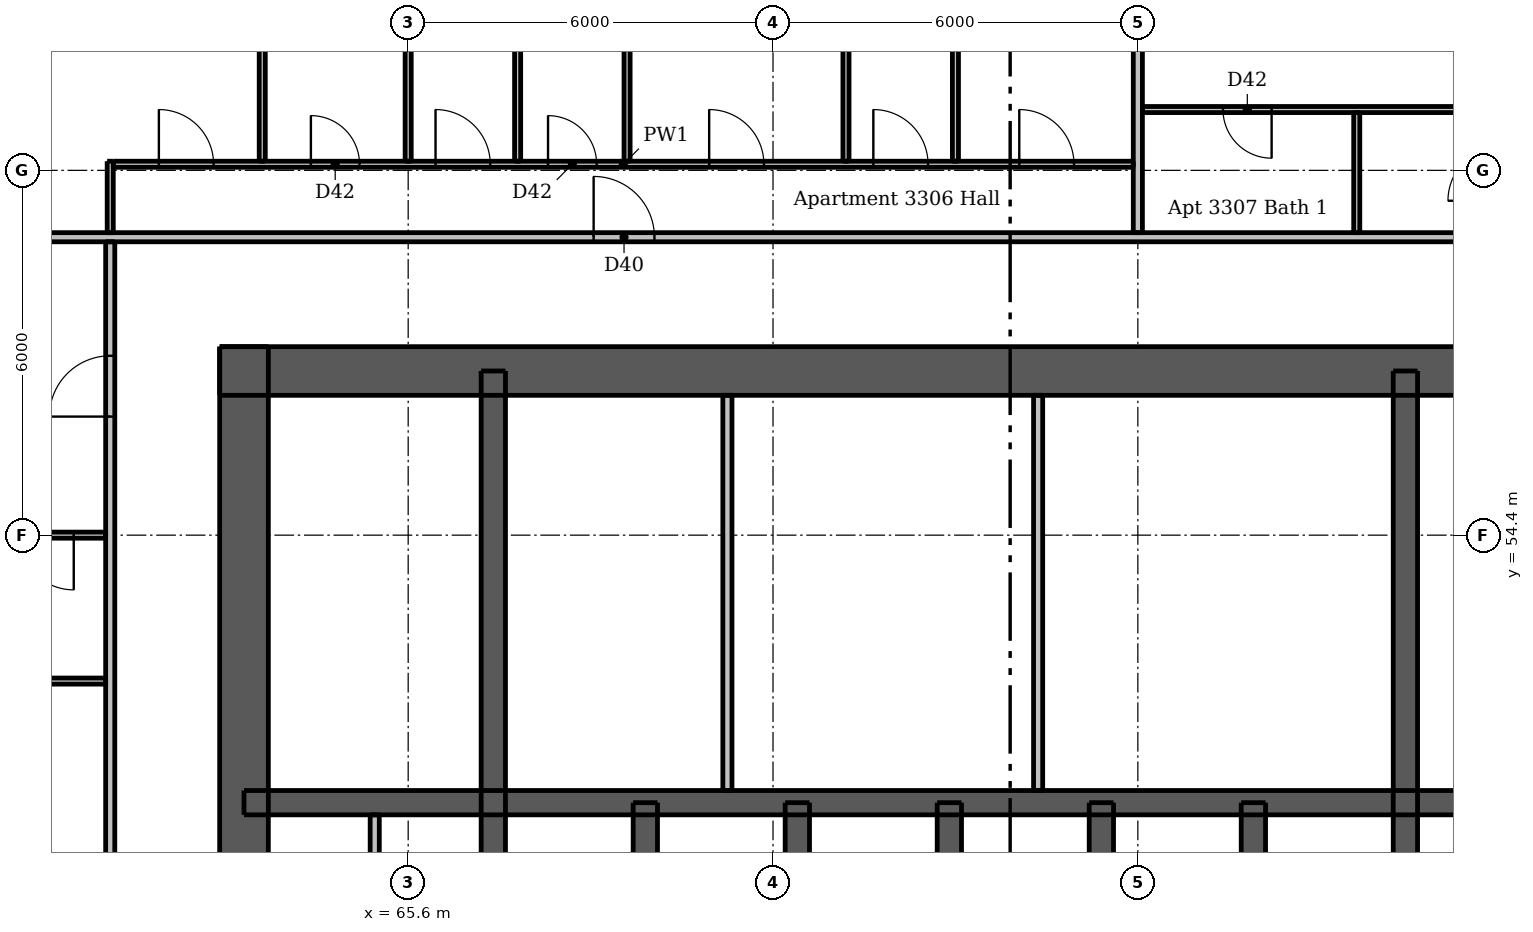
"""IFC4 building model, lengths in metres.
Left out: names, types, materials, properties, quantities, classifications, styles, units other than length and angle.
Written with IfcOpenShell. Run it as: python <this file> out.ifc"""

import sys

from ifc_helpers import new_model, si_unit, direction, frame, frame_2d, origin, place, context, subcontext, project, spatial, rectangle, extrude, element, fill, save


model = new_model("IFC4")
c1 = context("Model", 3, precision=1e-05, world=origin(), true_north=direction((0.0, 1.0)))
c2 = subcontext(c1, "Body", "Model", "MODEL_VIEW")
j1 = project(units=[si_unit("LENGTHUNIT", "METRE"), si_unit("PLANEANGLEUNIT", "RADIAN")], contexts=[c1])
p1 = place(None, origin())
s1 = spatial("IfcSite", under=j1, at=p1, CompositionType="ELEMENT")
p2 = place(p1, origin())
s2 = spatial("IfcBuilding", under=s1, at=p2, CompositionType="ELEMENT")
p3 = place(p2, frame((0.0, 0.0, 121.6)))
s3 = spatial("IfcBuildingStorey", under=s2, at=p3, CompositionType="ELEMENT", Elevation=121.6)
p4 = place(p3, frame((62.5, 57.1, 0.0), z_axis=(0.0, 0.0, 1.0), x_axis=(1.0, 0.0, 0.0)))
e1 = element("IfcWall", 1, at=p4, inside=s3, PredefinedType="SHEAR", context=c2, shape_type="SweptSolid", body=[
    extrude(rectangle(XDim=24.0, YDim=0.8, at=frame_2d((12.0, 0.0))), origin(), (0.0, 0.0, 1.0), 2.95),
])
p5 = place(p4, frame((20.9, 0.0, 0.0)))
e2 = element("IfcOpeningElement", 2, at=p5, cuts=e1, PredefinedType="OPENING", context=c2, shape_type="SweptSolid", body=[
    extrude(rectangle(XDim=1.1, YDim=2.1, at=frame_2d((0.55, 1.05))), frame((0.0, 0.41, 0.0), z_axis=(0.0, -1.0, 0.0), x_axis=(1.0, 0.0, 0.0)), (0.0, 0.0, 1.0), 0.82),
])
p6 = place(p4, frame((2.0, 0.0, 0.0)))
e3 = element("IfcOpeningElement", 3, at=p6, cuts=e1, PredefinedType="OPENING", context=c2, shape_type="SweptSolid", body=[
    extrude(rectangle(XDim=1.1, YDim=2.1, at=frame_2d((0.55, 1.05))), frame((0.0, 0.41, 0.0), z_axis=(0.0, -1.0, 0.0), x_axis=(1.0, 0.0, 0.0)), (0.0, 0.0, 1.0), 0.82),
])
p7 = place(p4, frame((6.075, 0.0, 0.0)))
e4 = element("IfcOpeningElement", 4, at=p7, cuts=e1, PredefinedType="OPENING", context=c2, shape_type="SweptSolid", body=[
    extrude(rectangle(XDim=0.9, YDim=2.1, at=frame_2d((0.45, 1.05))), frame((0.0, 0.41, 0.0), z_axis=(0.0, -1.0, 0.0), x_axis=(1.0, 0.0, 0.0)), (0.0, 0.0, 1.0), 0.82),
])
p8 = place(p4, frame((10.455, 0.0, 0.0)))
e5 = element("IfcOpeningElement", 5, at=p8, cuts=e1, PredefinedType="OPENING", context=c2, shape_type="SweptSolid", body=[
    extrude(rectangle(XDim=0.9, YDim=2.1, at=frame_2d((0.45, 1.05))), frame((0.0, 0.41, 0.0), z_axis=(0.0, -1.0, 0.0), x_axis=(1.0, 0.0, 0.0)), (0.0, 0.0, 1.0), 0.82),
])
p9 = place(p4, frame((15.93, 0.0, 0.0)))
e6 = element("IfcOpeningElement", 6, at=p9, cuts=e1, PredefinedType="OPENING", context=c2, shape_type="SweptSolid", body=[
    extrude(rectangle(XDim=0.9, YDim=2.1, at=frame_2d((0.45, 1.05))), frame((0.0, 0.41, 0.0), z_axis=(0.0, -1.0, 0.0), x_axis=(1.0, 0.0, 0.0)), (0.0, 0.0, 1.0), 0.82),
])
p10 = place(p3, frame((62.9, 33.5, 0.0), z_axis=(0.0, 0.0, 1.0), x_axis=(0.0, 1.0, 0.0)))
e7 = element("IfcWall", 7, at=p10, inside=s3, PredefinedType="SHEAR", context=c2, shape_type="SweptSolid", body=[
    extrude(rectangle(XDim=24.0, YDim=0.8, at=frame_2d((12.0, 0.0))), origin(), (0.0, 0.0, 1.0), 2.95),
])
p11 = place(p10, frame((11.2, 0.0, 0.0)))
e8 = element("IfcOpeningElement", 8, at=p11, cuts=e7, PredefinedType="OPENING", context=c2, shape_type="SweptSolid", body=[
    extrude(rectangle(XDim=1.6, YDim=2.1, at=frame_2d((0.8, 1.05))), frame((0.0, 0.41, 0.0), z_axis=(0.0, -1.0, 0.0), x_axis=(1.0, 0.0, 0.0)), (0.0, 0.0, 1.0), 0.82),
])
p12 = place(p3, frame((62.9, 50.0, 0.0), z_axis=(0.0, 0.0, 1.0), x_axis=(1.0, 0.0, 0.0)))
e9 = element("IfcWall", 9, at=p12, inside=s3, PredefinedType="SHEAR", context=c2, shape_type="SweptSolid", body=[
    extrude(rectangle(XDim=23.2, YDim=0.4, at=frame_2d((11.6, 0.0))), origin(), (0.0, 0.0, 1.0), 2.95),
])
for number, where, z_axis, x_axis in (
    (10, (67.0, 47.1, 0.0), (0.0, 0.0, 1.0), (0.0, 1.0, 0.0)),
    (11, (82.0, 47.1, 0.0), (0.0, 0.0, 1.0), (0.0, 1.0, 0.0)),
):
    element("IfcWall", number, at=place(p3, frame(where, z_axis=z_axis, x_axis=x_axis)), inside=s3, PredefinedType="SHEAR", context=c2, shape_type="SweptSolid", body=[
        extrude(rectangle(XDim=10.0, YDim=0.4, at=frame_2d((5.0, 0.0))), origin(), (0.0, 0.0, 1.0), 2.95),
    ])
for number, where, z_axis, x_axis in (
    (12, (69.5, 47.1, 0.0), (0.0, 0.0, 1.0), (0.0, 1.0, 0.0)),
    (13, (72.0, 47.1, 0.0), (0.0, 0.0, 1.0), (0.0, 1.0, 0.0)),
    (14, (74.5, 47.1, 0.0), (0.0, 0.0, 1.0), (0.0, 1.0, 0.0)),
    (15, (77.0, 47.1, 0.0), (0.0, 0.0, 1.0), (0.0, 1.0, 0.0)),
    (16, (79.5, 47.1, 0.0), (0.0, 0.0, 1.0), (0.0, 1.0, 0.0)),
):
    element("IfcWall", number, at=place(p3, frame(where, z_axis=z_axis, x_axis=x_axis)), inside=s3, PredefinedType="SHEAR", context=c2, shape_type="SweptSolid", body=[
        extrude(rectangle(XDim=2.9, YDim=0.4, at=frame_2d((1.45, 0.0))), origin(), (0.0, 0.0, 1.0), 2.95),
    ])
p13 = place(p3, frame((65.05, 47.3, 0.0), z_axis=(0.0, 0.0, 1.0), x_axis=(0.0, 1.0, 0.0)))
e17 = element("IfcWall", 17, at=p13, inside=s3, PredefinedType="PLUMBINGWALL", context=c2, shape_type="SweptSolid", body=[
    extrude(rectangle(XDim=2.5, YDim=0.15, at=frame_2d((1.25, 0.0))), origin(), (0.0, 0.0, 1.0), 2.95),
])
for number, where, z_axis, x_axis in (
    (18, (70.85, 50.2, 0.0), (0.0, 0.0, 1.0), (0.0, 1.0, 0.0)),
    (19, (75.96, 50.2, 0.0), (0.0, 0.0, 1.0), (0.0, 1.0, 0.0)),
):
    element("IfcWall", number, at=place(p3, frame(where, z_axis=z_axis, x_axis=x_axis)), inside=s3, PredefinedType="PLUMBINGWALL", context=c2, shape_type="SweptSolid", body=[
        extrude(rectangle(XDim=6.5, YDim=0.15, at=frame_2d((3.25, 0.0))), origin(), (0.0, 0.0, 1.0), 2.95),
    ])
p14 = place(p3, frame((60.7, 59.375, 0.0), z_axis=(0.0, 0.0, 1.0), x_axis=(0.0, 1.0, 0.0)))
e20 = element("IfcWall", 20, at=p14, inside=s3, PredefinedType="PARTITIONING", context=c2, shape_type="SweptSolid", body=[
    extrude(rectangle(XDim=1.175, YDim=0.1, at=frame_2d((0.587, 0.0))), origin(), (0.0, 0.0, 1.0), 2.95),
])
p15 = place(p3, frame((63.2, 60.55, 0.0), z_axis=(0.0, 0.0, 1.0), x_axis=(0.0, 1.0, 0.0)))
e21 = element("IfcWall", 21, at=p15, inside=s3, PredefinedType="PARTITIONING", context=c2, shape_type="SweptSolid", body=[
    extrude(rectangle(XDim=4.9, YDim=0.1, at=frame_2d((2.45, 0.0))), origin(), (0.0, 0.0, 1.0), 2.95),
])
p16 = place(p3, frame((65.6, 60.55, 0.0), z_axis=(0.0, 0.0, 1.0), x_axis=(0.0, 1.0, 0.0)))
e22 = element("IfcWall", 22, at=p16, inside=s3, PredefinedType="PARTITIONING", context=c2, shape_type="SweptSolid", body=[
    extrude(rectangle(XDim=7.45, YDim=0.1, at=frame_2d((3.725, 0.0))), origin(), (0.0, 0.0, 1.0), 2.332),
])
p17 = place(p3, frame((67.4, 60.55, 0.0), z_axis=(0.0, 0.0, 1.0), x_axis=(0.0, 1.0, 0.0)))
e23 = element("IfcWall", 23, at=p17, inside=s3, PredefinedType="PARTITIONING", context=c2, shape_type="SweptSolid", body=[
    extrude(rectangle(XDim=4.8, YDim=0.1, at=frame_2d((2.4, 0.0))), origin(), (0.0, 0.0, 1.0), 2.95),
])
for number, where, z_axis, x_axis in (
    (24, (69.2, 60.55, 0.0), (0.0, 0.0, 1.0), (0.0, 1.0, 0.0)),
    (25, (72.8, 60.55, 0.0), (0.0, 0.0, 1.0), (0.0, 1.0, 0.0)),
):
    element("IfcWall", number, at=place(p3, frame(where, z_axis=z_axis, x_axis=x_axis)), inside=s3, PredefinedType="PARTITIONING", context=c2, shape_type="SweptSolid", body=[
        extrude(rectangle(XDim=4.9, YDim=0.1, at=frame_2d((2.45, 0.0))), origin(), (0.0, 0.0, 1.0), 2.95),
    ])
p18 = place(p3, frame((74.6, 60.55, 0.0), z_axis=(0.0, 0.0, 1.0), x_axis=(0.0, 1.0, 0.0)))
e26 = element("IfcWall", 26, at=p18, inside=s3, PredefinedType="PARTITIONING", context=c2, shape_type="SweptSolid", body=[
    extrude(rectangle(XDim=4.8, YDim=0.1, at=frame_2d((2.4, 0.0))), origin(), (0.0, 0.0, 1.0), 2.95),
])
p19 = place(p3, frame((81.2, 59.375, 0.0), z_axis=(0.0, 0.0, 1.0), x_axis=(0.0, 1.0, 0.0)))
e27 = element("IfcWall", 27, at=p19, inside=s3, PredefinedType="PARTITIONING", context=c2, shape_type="SweptSolid", body=[
    extrude(rectangle(XDim=1.975, YDim=0.1, at=frame_2d((0.988, 0.0))), origin(), (0.0, 0.0, 1.0), 2.95),
])
p20 = place(p3, frame((83.55, 61.4, 0.0), z_axis=(0.0, 0.0, 1.0), x_axis=(-1.0, 0.0, 0.0)))
e28 = element("IfcWall", 28, at=p20, inside=s3, PredefinedType="PARTITIONING", context=c2, shape_type="SweptSolid", body=[
    extrude(rectangle(XDim=5.875, YDim=0.1, at=frame_2d((2.938, 0.0))), origin(), (0.0, 0.0, 1.0), 2.95),
])
p21 = place(p20, frame((3.75, 0.0, 0.0)))
e29 = element("IfcOpeningElement", 29, at=p21, cuts=e28, PredefinedType="OPENING", context=c2, shape_type="SweptSolid", body=[
    extrude(rectangle(XDim=0.8, YDim=2.1, at=frame_2d((0.4, 1.05))), frame((0.0, 0.06, 0.0), z_axis=(0.0, -1.0, 0.0), x_axis=(1.0, 0.0, 0.0)), (0.0, 0.0, 1.0), 0.12),
])
p22 = place(p3, frame((60.75, 60.5, 0.0), z_axis=(0.0, 0.0, 1.0), x_axis=(1.0, 0.0, 0.0)))
e30 = element("IfcWall", 30, at=p22, inside=s3, PredefinedType="PARTITIONING", context=c2, shape_type="SweptSolid", body=[
    extrude(rectangle(XDim=16.775, YDim=0.1, at=frame_2d((8.387, 0.0))), origin(), (0.0, 0.0, 1.0), 2.95),
])
p23 = place(p22, frame((9.8, 0.0, 0.0)))
e31 = element("IfcOpeningElement", 31, at=p23, cuts=e30, PredefinedType="OPENING", context=c2, shape_type="SweptSolid", body=[
    extrude(rectangle(XDim=0.9, YDim=2.1, at=frame_2d((0.45, 1.05))), frame((0.0, 0.06, 0.0), z_axis=(0.0, -1.0, 0.0), x_axis=(1.0, 0.0, 0.0)), (0.0, 0.0, 1.0), 0.12),
])
p24 = place(p22, frame((14.9, 0.0, 0.0)))
e32 = element("IfcOpeningElement", 32, at=p24, cuts=e30, PredefinedType="OPENING", context=c2, shape_type="SweptSolid", body=[
    extrude(rectangle(XDim=0.9, YDim=2.1, at=frame_2d((0.45, 1.05))), frame((0.0, 0.06, 0.0), z_axis=(0.0, -1.0, 0.0), x_axis=(1.0, 0.0, 0.0)), (0.0, 0.0, 1.0), 0.12),
])
p25 = place(p22, frame((12.5, 0.0, 0.0)))
e33 = element("IfcOpeningElement", 33, at=p25, cuts=e30, PredefinedType="OPENING", context=c2, shape_type="SweptSolid", body=[
    extrude(rectangle(XDim=0.9, YDim=2.1, at=frame_2d((0.45, 1.05))), frame((0.0, 0.06, 0.0), z_axis=(0.0, -1.0, 0.0), x_axis=(1.0, 0.0, 0.0)), (0.0, 0.0, 1.0), 0.12),
])
p26 = place(p22, frame((5.3, 0.0, 0.0)))
e34 = element("IfcOpeningElement", 34, at=p26, cuts=e30, PredefinedType="OPENING", context=c2, shape_type="SweptSolid", body=[
    extrude(rectangle(XDim=0.9, YDim=2.1, at=frame_2d((0.45, 1.05))), frame((0.0, 0.06, 0.0), z_axis=(0.0, -1.0, 0.0), x_axis=(1.0, 0.0, 0.0)), (0.0, 0.0, 1.0), 0.12),
])
p27 = place(p22, frame((7.15, 0.0, 0.0)))
e35 = element("IfcOpeningElement", 35, at=p27, cuts=e30, PredefinedType="OPENING", context=c2, shape_type="SweptSolid", body=[
    extrude(rectangle(XDim=0.8, YDim=2.1, at=frame_2d((0.4, 1.05))), frame((0.0, 0.06, 0.0), z_axis=(0.0, -1.0, 0.0), x_axis=(1.0, 0.0, 0.0)), (0.0, 0.0, 1.0), 0.12),
])
p28 = place(p22, frame((0.75, 0.0, 0.0)))
e36 = element("IfcOpeningElement", 36, at=p28, cuts=e30, PredefinedType="OPENING", context=c2, shape_type="SweptSolid", body=[
    extrude(rectangle(XDim=0.9, YDim=2.1, at=frame_2d((0.45, 1.05))), frame((0.0, 0.06, 0.0), z_axis=(0.0, -1.0, 0.0), x_axis=(1.0, 0.0, 0.0)), (0.0, 0.0, 1.0), 0.12),
])
p29 = place(p22, frame((3.25, 0.0, 0.0)))
e37 = element("IfcOpeningElement", 37, at=p29, cuts=e30, PredefinedType="OPENING", context=c2, shape_type="SweptSolid", body=[
    extrude(rectangle(XDim=0.8, YDim=2.1, at=frame_2d((0.4, 1.05))), frame((0.0, 0.06, 0.0), z_axis=(0.0, -1.0, 0.0), x_axis=(1.0, 0.0, 0.0)), (0.0, 0.0, 1.0), 0.12),
])
p30 = place(p3, frame((60.625, 54.4, 0.0), z_axis=(0.0, 0.0, 1.0), x_axis=(-1.0, 0.0, 0.0)))
e38 = element("IfcWall", 38, at=p30, inside=s3, PredefinedType="PARTITIONING", context=c2, shape_type="SweptSolid", body=[
    extrude(rectangle(XDim=8.625, YDim=0.1, at=frame_2d((4.312, 0.0))), origin(), (0.0, 0.0, 1.0), 2.332),
])
p31 = place(p30, frame((0.525, 0.0, 0.0)))
e39 = element("IfcOpeningElement", 39, at=p31, cuts=e38, PredefinedType="OPENING", context=c2, shape_type="SweptSolid", body=[
    extrude(rectangle(XDim=0.9, YDim=2.1, at=frame_2d((0.45, 1.05))), frame((0.0, 0.06, 0.0), z_axis=(0.0, -1.0, 0.0), x_axis=(1.0, 0.0, 0.0)), (0.0, 0.0, 1.0), 0.12),
])
p32 = place(p30, frame((4.875, 0.0, 0.0)))
e40 = element("IfcOpeningElement", 40, at=p32, cuts=e38, PredefinedType="OPENING", context=c2, shape_type="SweptSolid", body=[
    extrude(rectangle(XDim=0.9, YDim=2.1, at=frame_2d((0.45, 1.05))), frame((0.0, 0.06, 0.0), z_axis=(0.0, -1.0, 0.0), x_axis=(1.0, 0.0, 0.0)), (0.0, 0.0, 1.0), 0.12),
])
p33 = place(p3, frame((58.65, 52.0, 0.0), z_axis=(0.0, 0.0, 1.0), x_axis=(1.0, 0.0, 0.0)))
e41 = element("IfcWall", 41, at=p33, inside=s3, PredefinedType="PARTITIONING", context=c2, shape_type="SweptSolid", body=[
    extrude(rectangle(XDim=1.975, YDim=0.1, at=frame_2d((0.988, 0.0))), origin(), (0.0, 0.0, 1.0), 2.95),
])
p34 = place(p3, frame((60.7, 30.325, 0.0), z_axis=(0.0, 0.0, 1.0), x_axis=(0.0, 1.0, 0.0)))
e42 = element("IfcWall", 42, at=p34, inside=s3, PredefinedType="PARTITIONING", context=c2, shape_type="SweptSolid", body=[
    extrude(rectangle(XDim=28.9, YDim=0.15, at=frame_2d((14.45, 0.0))), origin(), (0.0, 0.0, 1.0), 2.95),
])
p35 = place(p34, frame((9.225, 0.0, 0.0)))
e43 = element("IfcOpeningElement", 43, at=p35, cuts=e42, PredefinedType="OPENING", context=c2, shape_type="SweptSolid", body=[
    extrude(rectangle(XDim=1.0, YDim=2.1, at=frame_2d((0.5, 1.05))), frame((0.0, 0.085, 0.0), z_axis=(0.0, -1.0, 0.0), x_axis=(1.0, 0.0, 0.0)), (0.0, 0.0, 1.0), 0.17),
])
p36 = place(p34, frame((26.025, 0.0, 0.0)))
e44 = element("IfcOpeningElement", 44, at=p36, cuts=e42, PredefinedType="OPENING", context=c2, shape_type="SweptSolid", body=[
    extrude(rectangle(XDim=1.0, YDim=2.1, at=frame_2d((0.5, 1.05))), frame((0.0, 0.085, 0.0), z_axis=(0.0, -1.0, 0.0), x_axis=(1.0, 0.0, 0.0)), (0.0, 0.0, 1.0), 0.17),
])
p37 = place(p3, frame((77.6, 59.375, 0.0), z_axis=(0.0, 0.0, 1.0), x_axis=(0.0, 1.0, 0.0)))
e45 = element("IfcWall", 45, at=p37, inside=s3, PredefinedType="PARTITIONING", context=c2, shape_type="SweptSolid", body=[
    extrude(rectangle(XDim=8.625, YDim=0.15, at=frame_2d((4.312, 0.0))), origin(), (0.0, 0.0, 1.0), 2.332),
])
p38 = place(p3, frame((59.675, 59.3, 0.0), z_axis=(0.0, 0.0, 1.0), x_axis=(1.0, 0.0, 0.0)))
e46 = element("IfcWall", 46, at=p38, inside=s3, PredefinedType="PARTITIONING", context=c2, shape_type="SweptSolid", body=[
    extrude(rectangle(XDim=28.55, YDim=0.15, at=frame_2d((14.275, 0.0))), origin(), (0.0, 0.0, 1.0), 2.95),
])
p39 = place(p38, frame((8.975, 0.0, 0.0)))
e47 = element("IfcOpeningElement", 47, at=p39, cuts=e46, PredefinedType="OPENING", context=c2, shape_type="SweptSolid", body=[
    extrude(rectangle(XDim=1.0, YDim=2.1, at=frame_2d((0.5, 1.05))), frame((0.0, 0.085, 0.0), z_axis=(0.0, -1.0, 0.0), x_axis=(1.0, 0.0, 0.0)), (0.0, 0.0, 1.0), 0.17),
])
p40 = place(p38, frame((25.775, 0.0, 0.0)))
e48 = element("IfcOpeningElement", 48, at=p40, cuts=e46, PredefinedType="OPENING", context=c2, shape_type="SweptSolid", body=[
    extrude(rectangle(XDim=1.0, YDim=2.1, at=frame_2d((0.5, 1.05))), frame((0.0, 0.085, 0.0), z_axis=(0.0, -1.0, 0.0), x_axis=(1.0, 0.0, 0.0)), (0.0, 0.0, 1.0), 0.17),
])
p41 = place(p6, origin())
e49 = element("IfcDoor", 49, at=p41, inside=s3, OperationType="SINGLE_SWING_LEFT", PredefinedType="DOOR", context=c2, shape_type="SweptSolid", body=[
    extrude(rectangle(XDim=1.1, YDim=2.1, at=frame_2d((0.55, 1.05))), frame((0.0, -0.337, 0.0), z_axis=(0.0, -1.0, 0.0), x_axis=(1.0, 0.0, 0.0)), (0.0, 0.0, 1.0), 0.05),
])
fill(e3, e49)
p42 = place(p7, origin())
e50 = element("IfcDoor", 50, at=p42, inside=s3, OperationType="SINGLE_SWING_RIGHT", PredefinedType="DOOR", context=c2, shape_type="SweptSolid", body=[
    extrude(rectangle(XDim=0.9, YDim=2.1, at=frame_2d((0.45, 1.05))), frame((0.0, -0.337, 0.0), z_axis=(0.0, -1.0, 0.0), x_axis=(1.0, 0.0, 0.0)), (0.0, 0.0, 1.0), 0.05),
])
fill(e4, e50)
p43 = place(p8, origin())
e51 = element("IfcDoor", 51, at=p43, inside=s3, OperationType="SINGLE_SWING_RIGHT", PredefinedType="DOOR", context=c2, shape_type="SweptSolid", body=[
    extrude(rectangle(XDim=0.9, YDim=2.1, at=frame_2d((0.45, 1.05))), frame((0.0, -0.337, 0.0), z_axis=(0.0, -1.0, 0.0), x_axis=(1.0, 0.0, 0.0)), (0.0, 0.0, 1.0), 0.05),
])
fill(e5, e51)
p44 = place(p9, origin())
e52 = element("IfcDoor", 52, at=p44, inside=s3, OperationType="SINGLE_SWING_RIGHT", PredefinedType="DOOR", context=c2, shape_type="SweptSolid", body=[
    extrude(rectangle(XDim=0.9, YDim=2.1, at=frame_2d((0.45, 1.05))), frame((0.0, -0.337, 0.0), z_axis=(0.0, -1.0, 0.0), x_axis=(1.0, 0.0, 0.0)), (0.0, 0.0, 1.0), 0.05),
])
fill(e6, e52)
p45 = place(p39, origin())
e53 = element("IfcDoor", 53, at=p45, inside=s3, OperationType="SINGLE_SWING_LEFT", PredefinedType="DOOR", context=c2, shape_type="SweptSolid", body=[
    extrude(rectangle(XDim=1.0, YDim=2.1, at=frame_2d((0.5, 1.05))), frame((0.0, 0.025, 0.0), z_axis=(0.0, -1.0, 0.0), x_axis=(1.0, 0.0, 0.0)), (0.0, 0.0, 1.0), 0.05),
])
fill(e47, e53)
p46 = place(p23, origin())
e54 = element("IfcDoor", 54, at=p46, inside=s3, OperationType="SINGLE_SWING_LEFT", PredefinedType="DOOR", context=c2, shape_type="SweptSolid", body=[
    extrude(rectangle(XDim=0.9, YDim=2.1, at=frame_2d((0.45, 1.05))), frame((0.0, 0.025, 0.0), z_axis=(0.0, -1.0, 0.0), x_axis=(1.0, 0.0, 0.0)), (0.0, 0.0, 1.0), 0.05),
])
fill(e31, e54)
p47 = place(p24, origin())
e55 = element("IfcDoor", 55, at=p47, inside=s3, OperationType="SINGLE_SWING_LEFT", PredefinedType="DOOR", context=c2, shape_type="SweptSolid", body=[
    extrude(rectangle(XDim=0.9, YDim=2.1, at=frame_2d((0.45, 1.05))), frame((0.0, 0.025, 0.0), z_axis=(0.0, -1.0, 0.0), x_axis=(1.0, 0.0, 0.0)), (0.0, 0.0, 1.0), 0.05),
])
fill(e32, e55)
p48 = place(p25, origin())
e56 = element("IfcDoor", 56, at=p48, inside=s3, OperationType="SINGLE_SWING_LEFT", PredefinedType="DOOR", context=c2, shape_type="SweptSolid", body=[
    extrude(rectangle(XDim=0.9, YDim=2.1, at=frame_2d((0.45, 1.05))), frame((0.0, 0.025, 0.0), z_axis=(0.0, -1.0, 0.0), x_axis=(1.0, 0.0, 0.0)), (0.0, 0.0, 1.0), 0.05),
])
fill(e33, e56)
p49 = place(p26, origin())
e57 = element("IfcDoor", 57, at=p49, inside=s3, OperationType="SINGLE_SWING_LEFT", PredefinedType="DOOR", context=c2, shape_type="SweptSolid", body=[
    extrude(rectangle(XDim=0.9, YDim=2.1, at=frame_2d((0.45, 1.05))), frame((0.0, 0.025, 0.0), z_axis=(0.0, -1.0, 0.0), x_axis=(1.0, 0.0, 0.0)), (0.0, 0.0, 1.0), 0.05),
])
fill(e34, e57)
p50 = place(p27, origin())
e58 = element("IfcDoor", 58, at=p50, inside=s3, OperationType="SINGLE_SWING_LEFT", PredefinedType="DOOR", context=c2, shape_type="SweptSolid", body=[
    extrude(rectangle(XDim=0.8, YDim=2.1, at=frame_2d((0.4, 1.05))), frame((0.0, 0.025, 0.0), z_axis=(0.0, -1.0, 0.0), x_axis=(1.0, 0.0, 0.0)), (0.0, 0.0, 1.0), 0.05),
])
fill(e35, e58)
p51 = place(p28, origin())
e59 = element("IfcDoor", 59, at=p51, inside=s3, OperationType="SINGLE_SWING_LEFT", PredefinedType="DOOR", context=c2, shape_type="SweptSolid", body=[
    extrude(rectangle(XDim=0.9, YDim=2.1, at=frame_2d((0.45, 1.05))), frame((0.0, 0.025, 0.0), z_axis=(0.0, -1.0, 0.0), x_axis=(1.0, 0.0, 0.0)), (0.0, 0.0, 1.0), 0.05),
])
fill(e36, e59)
p52 = place(p29, origin())
e60 = element("IfcDoor", 60, at=p52, inside=s3, OperationType="SINGLE_SWING_LEFT", PredefinedType="DOOR", context=c2, shape_type="SweptSolid", body=[
    extrude(rectangle(XDim=0.8, YDim=2.1, at=frame_2d((0.4, 1.05))), frame((0.0, 0.025, 0.0), z_axis=(0.0, -1.0, 0.0), x_axis=(1.0, 0.0, 0.0)), (0.0, 0.0, 1.0), 0.05),
])
fill(e37, e60)
p53 = place(p21, origin())
e61 = element("IfcDoor", 61, at=p53, inside=s3, OperationType="SINGLE_SWING_LEFT", PredefinedType="DOOR", context=c2, shape_type="SweptSolid", body=[
    extrude(rectangle(XDim=0.8, YDim=2.1, at=frame_2d((0.4, 1.05))), frame((0.0, 0.025, 0.0), z_axis=(0.0, -1.0, 0.0), x_axis=(1.0, 0.0, 0.0)), (0.0, 0.0, 1.0), 0.05),
])
fill(e29, e61)
p54 = place(p36, origin())
e62 = element("IfcDoor", 62, at=p54, inside=s3, OperationType="SINGLE_SWING_LEFT", PredefinedType="DOOR", context=c2, shape_type="SweptSolid", body=[
    extrude(rectangle(XDim=1.0, YDim=2.1, at=frame_2d((0.5, 1.05))), frame((0.0, 0.025, 0.0), z_axis=(0.0, -1.0, 0.0), x_axis=(1.0, 0.0, 0.0)), (0.0, 0.0, 1.0), 0.05),
])
fill(e44, e62)
p55 = place(p31, origin())
e63 = element("IfcDoor", 63, at=p55, inside=s3, OperationType="SINGLE_SWING_LEFT", PredefinedType="DOOR", context=c2, shape_type="SweptSolid", body=[
    extrude(rectangle(XDim=0.9, YDim=2.1, at=frame_2d((0.45, 1.05))), frame((0.0, 0.025, 0.0), z_axis=(0.0, -1.0, 0.0), x_axis=(1.0, 0.0, 0.0)), (0.0, 0.0, 1.0), 0.05),
])
fill(e39, e63)
save(model, sys.argv[1])
